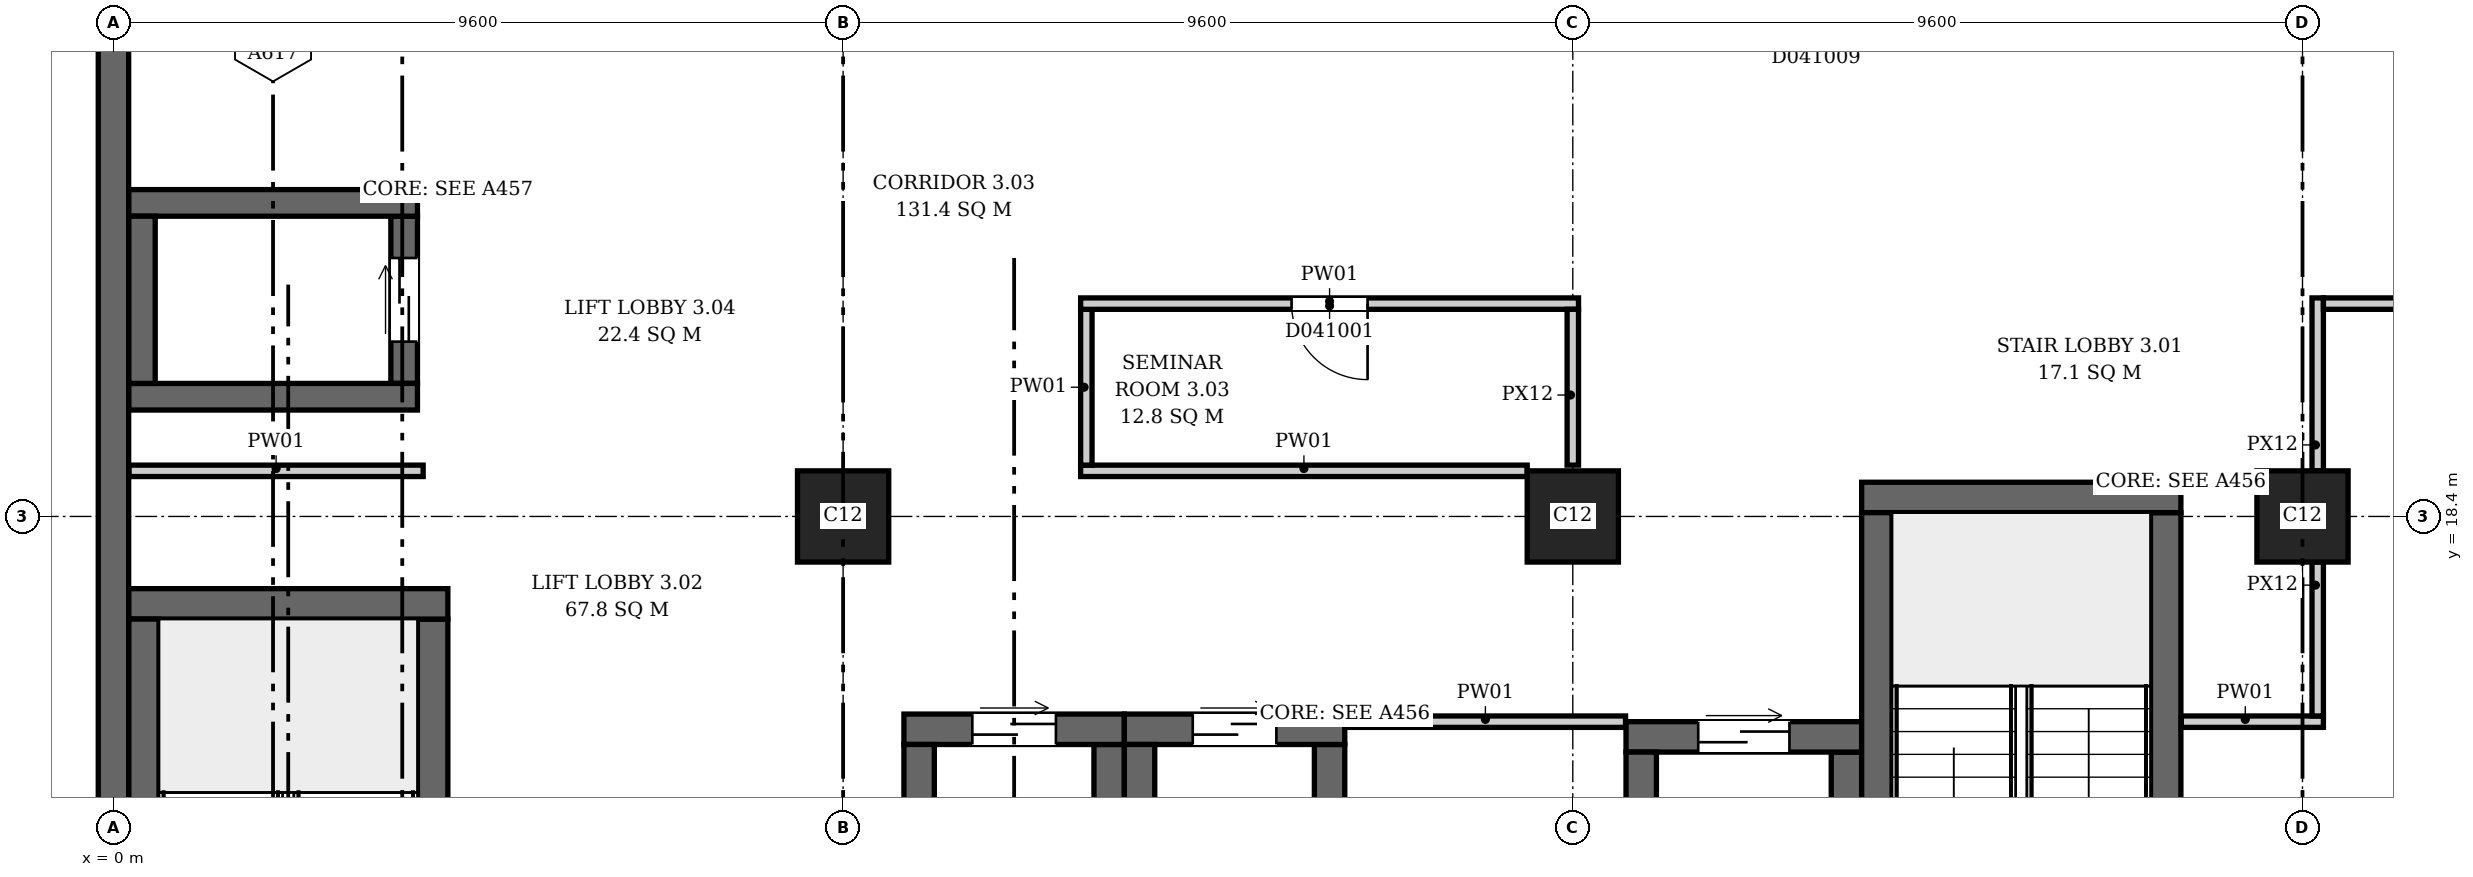
"""IFC4 building model, lengths in metres.
Left out: names, types, materials, properties, quantities, classifications, styles, units other than length and angle.
Written with IfcOpenShell. Run it as: python <this file> out.ifc"""

import sys

from ifc_helpers import new_model, si_unit, direction, frame, frame_2d, origin, origin_2d, place, context, subcontext, project, spatial, rectangle, extrude, element, fill, save


model = new_model("IFC4")
c1 = context("Model", 3, precision=1e-05, world=origin(), true_north=direction((0.0, 1.0)))
c2 = subcontext(c1, "Body", "Model", "MODEL_VIEW")
j1 = project(units=[si_unit("LENGTHUNIT", "METRE"), si_unit("PLANEANGLEUNIT", "RADIAN")], contexts=[c1])
p1 = place(None, origin())
s1 = spatial("IfcSite", under=j1, at=p1, CompositionType="ELEMENT")
p2 = place(p1, origin())
s2 = spatial("IfcBuilding", under=s1, at=p2, CompositionType="ELEMENT")
p3 = place(p2, frame((0.0, 0.0, 21.7)))
s3 = spatial("IfcBuildingStorey", under=s2, at=p3, CompositionType="ELEMENT", Elevation=21.7)
p4 = place(p3, frame((0.0, -0.2, 0.0), z_axis=(0.0, 0.0, 1.0), x_axis=(0.0, 1.0, 0.0)))
e1 = element("IfcWall", 1, at=p4, inside=s3, PredefinedType="SHEAR", context=c2, shape_type="SweptSolid", body=[
    extrude(rectangle(XDim=46.88, YDim=0.4, at=frame_2d((23.44, 0.0))), origin(), (0.0, 0.0, 1.0), 5.0),
])
p5 = place(p3, frame((0.2, 17.25, 0.0), z_axis=(0.0, 0.0, 1.0), x_axis=(1.0, 0.0, 0.0)))
e2 = element("IfcWall", 2, at=p5, inside=s3, PredefinedType="SHEAR", context=c2, shape_type="SweptSolid", body=[
    extrude(rectangle(XDim=4.2, YDim=0.4, at=frame_2d((2.1, 0.0))), origin(), (0.0, 0.0, 1.0), 5.0),
])
for number, where, z_axis, x_axis in (
    (3, (0.4, 10.45, 0.0), (0.0, 0.0, 1.0), (0.0, 1.0, 0.0)),
    (4, (4.2, 10.45, 0.0), (0.0, 0.0, 1.0), (0.0, 1.0, 0.0)),
):
    element("IfcWall", number, at=place(p3, frame(where, z_axis=z_axis, x_axis=x_axis)), inside=s3, PredefinedType="SHEAR", context=c2, shape_type="SweptSolid", body=[
        extrude(rectangle(XDim=6.6, YDim=0.4, at=frame_2d((3.3, 0.0))), origin(), (0.0, 0.0, 1.0), 5.0),
    ])
p6 = place(p3, frame((23.0, 18.65, 0.0), z_axis=(0.0, 0.0, 1.0), x_axis=(1.0, 0.0, 0.0)))
e5 = element("IfcWall", 5, at=p6, inside=s3, PredefinedType="SHEAR", context=c2, shape_type="SweptSolid", body=[
    extrude(rectangle(XDim=4.2, YDim=0.4, at=frame_2d((2.1, 0.0))), origin(), (0.0, 0.0, 1.0), 5.0),
])
for number, where, z_axis, x_axis in (
    (6, (23.2, 11.85, 0.0), (0.0, 0.0, 1.0), (0.0, 1.0, 0.0)),
    (7, (27.0, 11.85, 0.0), (0.0, 0.0, 1.0), (0.0, 1.0, 0.0)),
):
    element("IfcWall", number, at=place(p3, frame(where, z_axis=z_axis, x_axis=x_axis)), inside=s3, PredefinedType="SHEAR", context=c2, shape_type="SweptSolid", body=[
        extrude(rectangle(XDim=6.6, YDim=0.4, at=frame_2d((3.3, 0.0))), origin(), (0.0, 0.0, 1.0), 5.0),
    ])
for number, where, z_axis, x_axis in (
    (8, (0.2, 19.975, 0.0), (0.0, 0.0, 1.0), (1.0, 0.0, 0.0)),
    (9, (0.2, 22.525, 0.0), (0.0, 0.0, 1.0), (1.0, 0.0, 0.0)),
):
    element("IfcWall", number, at=place(p3, frame(where, z_axis=z_axis, x_axis=x_axis)), inside=s3, PredefinedType="SHEAR", context=c2, shape_type="SweptSolid", body=[
        extrude(rectangle(XDim=3.8, YDim=0.35, at=frame_2d((1.9, 0.0))), origin(), (0.0, 0.0, 1.0), 5.0),
    ])
p7 = place(p3, frame((0.375, 20.15, 0.0), z_axis=(0.0, 0.0, 1.0), x_axis=(0.0, 1.0, 0.0)))
e10 = element("IfcWall", 10, at=p7, inside=s3, PredefinedType="SHEAR", context=c2, shape_type="SweptSolid", body=[
    extrude(rectangle(XDim=2.2, YDim=0.35, at=frame_2d((1.1, 0.0))), origin(), (0.0, 0.0, 1.0), 5.0),
])
p8 = place(p3, frame((3.825, 20.15, 0.0), z_axis=(0.0, 0.0, 1.0), x_axis=(0.0, 1.0, 0.0)))
e11 = element("IfcWall", 11, at=p8, inside=s3, PredefinedType="SHEAR", context=c2, shape_type="SweptSolid", body=[
    extrude(rectangle(XDim=2.2, YDim=0.35, at=frame_2d((1.1, 0.0))), origin(), (0.0, 0.0, 1.0), 5.0),
])
p9 = place(p8, frame((0.55, 0.0, 0.0)))
e12 = element("IfcOpeningElement", 12, at=p9, cuts=e11, PredefinedType="OPENING", context=c2, shape_type="SweptSolid", body=[
    extrude(rectangle(XDim=1.1, YDim=2.1, at=frame_2d((0.55, 1.05))), frame((0.0, 0.185, 0.0), z_axis=(0.0, -1.0, 0.0), x_axis=(1.0, 0.0, 0.0)), (0.0, 0.0, 1.0), 0.37),
])
p10 = place(p3, frame((10.4, 15.6, 0.0), z_axis=(0.0, 0.0, 1.0), x_axis=(1.0, 0.0, 0.0)))
e13 = element("IfcWall", 13, at=p10, inside=s3, PredefinedType="SHEAR", context=c2, shape_type="SweptSolid", body=[
    extrude(rectangle(XDim=2.9, YDim=0.4, at=frame_2d((1.45, 0.0))), origin(), (0.0, 0.0, 1.0), 5.0),
])
p11 = place(p10, frame((0.9, 0.0, 0.0)))
e14 = element("IfcOpeningElement", 14, at=p11, cuts=e13, PredefinedType="OPENING", context=c2, shape_type="SweptSolid", body=[
    extrude(rectangle(XDim=1.1, YDim=2.1, at=frame_2d((0.55, 1.05))), frame((0.0, 0.21, 0.0), z_axis=(0.0, -1.0, 0.0), x_axis=(1.0, 0.0, 0.0)), (0.0, 0.0, 1.0), 0.42),
])
for number, where, z_axis, x_axis in (
    (15, (10.6, 12.4, 0.0), (0.0, 0.0, 1.0), (0.0, 1.0, 0.0)),
    (16, (13.1, 12.4, 0.0), (0.0, 0.0, 1.0), (0.0, 1.0, 0.0)),
):
    element("IfcWall", number, at=place(p3, frame(where, z_axis=z_axis, x_axis=x_axis)), inside=s3, PredefinedType="SHEAR", context=c2, shape_type="SweptSolid", body=[
        extrude(rectangle(XDim=3.0, YDim=0.4, at=frame_2d((1.5, 0.0))), origin(), (0.0, 0.0, 1.0), 5.0),
    ])
p12 = place(p3, frame((13.3, 15.6, 0.0), z_axis=(0.0, 0.0, 1.0), x_axis=(1.0, 0.0, 0.0)))
e17 = element("IfcWall", 17, at=p12, inside=s3, PredefinedType="SHEAR", context=c2, shape_type="SweptSolid", body=[
    extrude(rectangle(XDim=2.9, YDim=0.4, at=frame_2d((1.45, 0.0))), origin(), (0.0, 0.0, 1.0), 5.0),
])
p13 = place(p12, frame((0.9, 0.0, 0.0)))
e18 = element("IfcOpeningElement", 18, at=p13, cuts=e17, PredefinedType="OPENING", context=c2, shape_type="SweptSolid", body=[
    extrude(rectangle(XDim=1.1, YDim=2.1, at=frame_2d((0.55, 1.05))), frame((0.0, 0.21, 0.0), z_axis=(0.0, -1.0, 0.0), x_axis=(1.0, 0.0, 0.0)), (0.0, 0.0, 1.0), 0.42),
])
for number, where, z_axis, x_axis in (
    (19, (13.5, 12.4, 0.0), (0.0, 0.0, 1.0), (0.0, 1.0, 0.0)),
    (20, (16.0, 12.4, 0.0), (0.0, 0.0, 1.0), (0.0, 1.0, 0.0)),
):
    element("IfcWall", number, at=place(p3, frame(where, z_axis=z_axis, x_axis=x_axis)), inside=s3, PredefinedType="SHEAR", context=c2, shape_type="SweptSolid", body=[
        extrude(rectangle(XDim=3.0, YDim=0.4, at=frame_2d((1.5, 0.0))), origin(), (0.0, 0.0, 1.0), 5.0),
    ])
p14 = place(p3, frame((19.9, 15.5, 0.0), z_axis=(0.0, 0.0, 1.0), x_axis=(1.0, 0.0, 0.0)))
e21 = element("IfcWall", 21, at=p14, inside=s3, PredefinedType="SHEAR", context=c2, shape_type="SweptSolid", body=[
    extrude(rectangle(XDim=3.1, YDim=0.4, at=frame_2d((1.55, 0.0))), origin(), (0.0, 0.0, 1.0), 5.0),
])
p15 = place(p14, frame((0.95, 0.0, 0.0)))
e22 = element("IfcOpeningElement", 22, at=p15, cuts=e21, PredefinedType="OPENING", context=c2, shape_type="SweptSolid", body=[
    extrude(rectangle(XDim=1.2, YDim=2.1, at=frame_2d((0.6, 1.05))), frame((0.0, 0.21, 0.0), z_axis=(0.0, -1.0, 0.0), x_axis=(1.0, 0.0, 0.0)), (0.0, 0.0, 1.0), 0.42),
])
for number, where, z_axis, x_axis in (
    (23, (20.1, 11.9, 0.0), (0.0, 0.0, 1.0), (0.0, 1.0, 0.0)),
    (24, (22.8, 11.9, 0.0), (0.0, 0.0, 1.0), (0.0, 1.0, 0.0)),
):
    element("IfcWall", number, at=place(p3, frame(where, z_axis=z_axis, x_axis=x_axis)), inside=s3, PredefinedType="SHEAR", context=c2, shape_type="SweptSolid", body=[
        extrude(rectangle(XDim=3.4, YDim=0.4, at=frame_2d((1.7, 0.0))), origin(), (0.0, 0.0, 1.0), 5.0),
    ])
for number, where, z_axis, x_axis in (
    (25, (9.6, 18.4, 0.0), (0.0, 0.0, 1.0), (1.0, 0.0, 0.0)),
    (26, (19.2, 18.4, 0.0), (0.0, 0.0, 1.0), (1.0, 0.0, 0.0)),
    (27, (28.8, 18.4, 0.0), (0.0, 0.0, 1.0), (1.0, 0.0, 0.0)),
):
    element("IfcColumn", number, at=place(p3, frame(where, z_axis=z_axis, x_axis=x_axis)), inside=s3, PredefinedType="COLUMN", context=c2, shape_type="SweptSolid", body=[
        extrude(rectangle(XDim=1.2, YDim=1.2, at=origin_2d()), origin(), (0.0, 0.0, 1.0), 5.0),
    ])
p16 = place(p3, frame((0.206, 19.0, 0.0), z_axis=(0.0, 0.0, 1.0), x_axis=(1.0, 0.0, 0.0)))
e28 = element("IfcWall", 28, at=p16, inside=s3, PredefinedType="PARTITIONING", context=c2, shape_type="SweptSolid", body=[
    extrude(rectangle(XDim=3.869, YDim=0.15, at=frame_2d((1.935, 0.0))), origin(), (0.0, 0.0, 1.0), 4.65),
])
p17 = place(p3, frame((12.725, 19.0, 0.0), z_axis=(0.0, 0.0, 1.0), x_axis=(1.0, 0.0, 0.0)))
e29 = element("IfcWall", 29, at=p17, inside=s3, PredefinedType="PARTITIONING", context=c2, shape_type="SweptSolid", body=[
    extrude(rectangle(XDim=5.875, YDim=0.15, at=frame_2d((2.938, 0.0))), origin(), (0.0, 0.0, 1.0), 4.65),
])
p18 = place(p3, frame((12.8, 19.075, 0.0), z_axis=(0.0, 0.0, 1.0), x_axis=(0.0, 1.0, 0.0)))
e30 = element("IfcWall", 30, at=p18, inside=s3, PredefinedType="PARTITIONING", context=c2, shape_type="SweptSolid", body=[
    extrude(rectangle(XDim=2.05, YDim=0.15, at=frame_2d((1.025, 0.0))), origin(), (0.0, 0.0, 1.0), 4.65),
])
p19 = place(p3, frame((12.725, 21.2, 0.0), z_axis=(0.0, 0.0, 1.0), x_axis=(1.0, 0.0, 0.0)))
e31 = element("IfcWall", 31, at=p19, inside=s3, PredefinedType="PARTITIONING", context=c2, shape_type="SweptSolid", body=[
    extrude(rectangle(XDim=6.55, YDim=0.15, at=frame_2d((3.275, 0.0))), origin(), (0.0, 0.0, 1.0), 4.65),
])
p20 = place(p19, frame((2.775, 0.0, 0.0)))
e32 = element("IfcOpeningElement", 32, at=p20, cuts=e31, PredefinedType="OPENING", context=c2, shape_type="SweptSolid", body=[
    extrude(rectangle(XDim=1.0, YDim=2.1, at=frame_2d((0.5, 1.05))), frame((0.0, 0.085, 0.0), z_axis=(0.0, -1.0, 0.0), x_axis=(1.0, 0.0, 0.0)), (0.0, 0.0, 1.0), 0.17),
])
p21 = place(p3, frame((16.206, 15.7, 0.0), z_axis=(0.0, 0.0, 1.0), x_axis=(1.0, 0.0, 0.0)))
e33 = element("IfcWall", 33, at=p21, inside=s3, PredefinedType="PARTITIONING", context=c2, shape_type="SweptSolid", body=[
    extrude(rectangle(XDim=3.688, YDim=0.15, at=frame_2d((1.844, 0.0))), origin(), (0.0, 0.0, 1.0), 4.65),
])
p22 = place(p3, frame((19.2, 19.075, 0.0), z_axis=(0.0, 0.0, 1.0), x_axis=(0.0, 1.0, 0.0)))
e34 = element("IfcWall", 34, at=p22, inside=s3, PredefinedType="PARTITIONING", context=c2, shape_type="SweptSolid", body=[
    extrude(rectangle(XDim=2.05, YDim=0.15, at=frame_2d((1.025, 0.0))), origin(), (0.0, 0.0, 1.0), 4.25),
])
p23 = place(p3, frame((27.206, 15.7, 0.0), z_axis=(0.0, 0.0, 1.0), x_axis=(1.0, 0.0, 0.0)))
e35 = element("IfcWall", 35, at=p23, inside=s3, PredefinedType="PARTITIONING", context=c2, shape_type="SweptSolid", body=[
    extrude(rectangle(XDim=1.869, YDim=0.15, at=frame_2d((0.935, 0.0))), origin(), (0.0, 0.0, 1.0), 4.65),
])
p24 = place(p3, frame((29.0, 15.775, 0.0), z_axis=(0.0, 0.0, 1.0), x_axis=(0.0, 1.0, 0.0)))
e36 = element("IfcWall", 36, at=p24, inside=s3, PredefinedType="PARTITIONING", context=c2, shape_type="SweptSolid", body=[
    extrude(rectangle(XDim=2.025, YDim=0.15, at=frame_2d((1.013, 0.0))), origin(), (0.0, 0.0, 1.0), 4.25),
])
p25 = place(p3, frame((29.0, 19.0, 0.0), z_axis=(0.0, 0.0, 1.0), x_axis=(0.0, 1.0, 0.0)))
e37 = element("IfcWall", 37, at=p25, inside=s3, PredefinedType="PARTITIONING", context=c2, shape_type="SweptSolid", body=[
    extrude(rectangle(XDim=2.275, YDim=0.15, at=frame_2d((1.137, 0.0))), origin(), (0.0, 0.0, 1.0), 4.25),
])
p26 = place(p3, frame((29.075, 21.2, 0.0), z_axis=(0.0, 0.0, 1.0), x_axis=(1.0, 0.0, 0.0)))
e38 = element("IfcWall", 38, at=p26, inside=s3, PredefinedType="PARTITIONING", context=c2, shape_type="SweptSolid", body=[
    extrude(rectangle(XDim=10.25, YDim=0.15, at=frame_2d((5.125, 0.0))), origin(), (0.0, 0.0, 1.0), 4.65),
])
p27 = place(p26, frame((1.035, 0.0, 0.0)))
e39 = element("IfcOpeningElement", 39, at=p27, cuts=e38, PredefinedType="OPENING", context=c2, shape_type="SweptSolid", body=[
    extrude(rectangle(XDim=1.0, YDim=2.1, at=frame_2d((0.5, 1.05))), frame((0.0, 0.085, 0.0), z_axis=(0.0, -1.0, 0.0), x_axis=(1.0, 0.0, 0.0)), (0.0, 0.0, 1.0), 0.17),
])
p28 = place(p26, frame((5.625, 0.0, 0.0)))
e40 = element("IfcOpeningElement", 40, at=p28, cuts=e38, PredefinedType="OPENING", context=c2, shape_type="SweptSolid", body=[
    extrude(rectangle(XDim=1.0, YDim=2.1, at=frame_2d((0.5, 1.05))), frame((0.0, 0.085, 0.0), z_axis=(0.0, -1.0, 0.0), x_axis=(1.0, 0.0, 0.0)), (0.0, 0.0, 1.0), 0.17),
])
p29 = place(p9, origin())
e41 = element("IfcDoor", 41, at=p29, inside=s3, OperationType="DOUBLE_DOOR_SLIDING", PredefinedType="DOOR", context=c2, shape_type="SweptSolid", body=[
    extrude(rectangle(XDim=1.1, YDim=2.1, at=frame_2d((0.55, 1.05))), frame((0.0, 0.025, 0.0), z_axis=(0.0, -1.0, 0.0), x_axis=(1.0, 0.0, 0.0)), (0.0, 0.0, 1.0), 0.05),
])
fill(e12, e41)
p30 = place(p11, origin())
e42 = element("IfcDoor", 42, at=p30, inside=s3, OperationType="DOUBLE_DOOR_SLIDING", PredefinedType="DOOR", context=c2, shape_type="SweptSolid", body=[
    extrude(rectangle(XDim=1.1, YDim=2.1, at=frame_2d((0.55, 1.05))), frame((0.0, 0.025, 0.0), z_axis=(0.0, -1.0, 0.0), x_axis=(1.0, 0.0, 0.0)), (0.0, 0.0, 1.0), 0.05),
])
fill(e14, e42)
p31 = place(p13, origin())
e43 = element("IfcDoor", 43, at=p31, inside=s3, OperationType="DOUBLE_DOOR_SLIDING", PredefinedType="DOOR", context=c2, shape_type="SweptSolid", body=[
    extrude(rectangle(XDim=1.1, YDim=2.1, at=frame_2d((0.55, 1.05))), frame((0.0, 0.025, 0.0), z_axis=(0.0, -1.0, 0.0), x_axis=(1.0, 0.0, 0.0)), (0.0, 0.0, 1.0), 0.05),
])
fill(e18, e43)
p32 = place(p15, origin())
e44 = element("IfcDoor", 44, at=p32, inside=s3, OperationType="DOUBLE_DOOR_SLIDING", PredefinedType="DOOR", context=c2, shape_type="SweptSolid", body=[
    extrude(rectangle(XDim=1.2, YDim=2.1, at=frame_2d((0.6, 1.05))), frame((0.0, 0.025, 0.0), z_axis=(0.0, -1.0, 0.0), x_axis=(1.0, 0.0, 0.0)), (0.0, 0.0, 1.0), 0.05),
])
fill(e22, e44)
p33 = place(p20, origin())
e45 = element("IfcDoor", 45, at=p33, inside=s3, OperationType="SINGLE_SWING_RIGHT", PredefinedType="DOOR", context=c2, shape_type="SweptSolid", body=[
    extrude(rectangle(XDim=1.0, YDim=2.1, at=frame_2d((0.5, 1.05))), frame((0.0, 0.025, 0.0), z_axis=(0.0, -1.0, 0.0), x_axis=(1.0, 0.0, 0.0)), (0.0, 0.0, 1.0), 0.05),
])
fill(e32, e45)
save(model, sys.argv[1])
